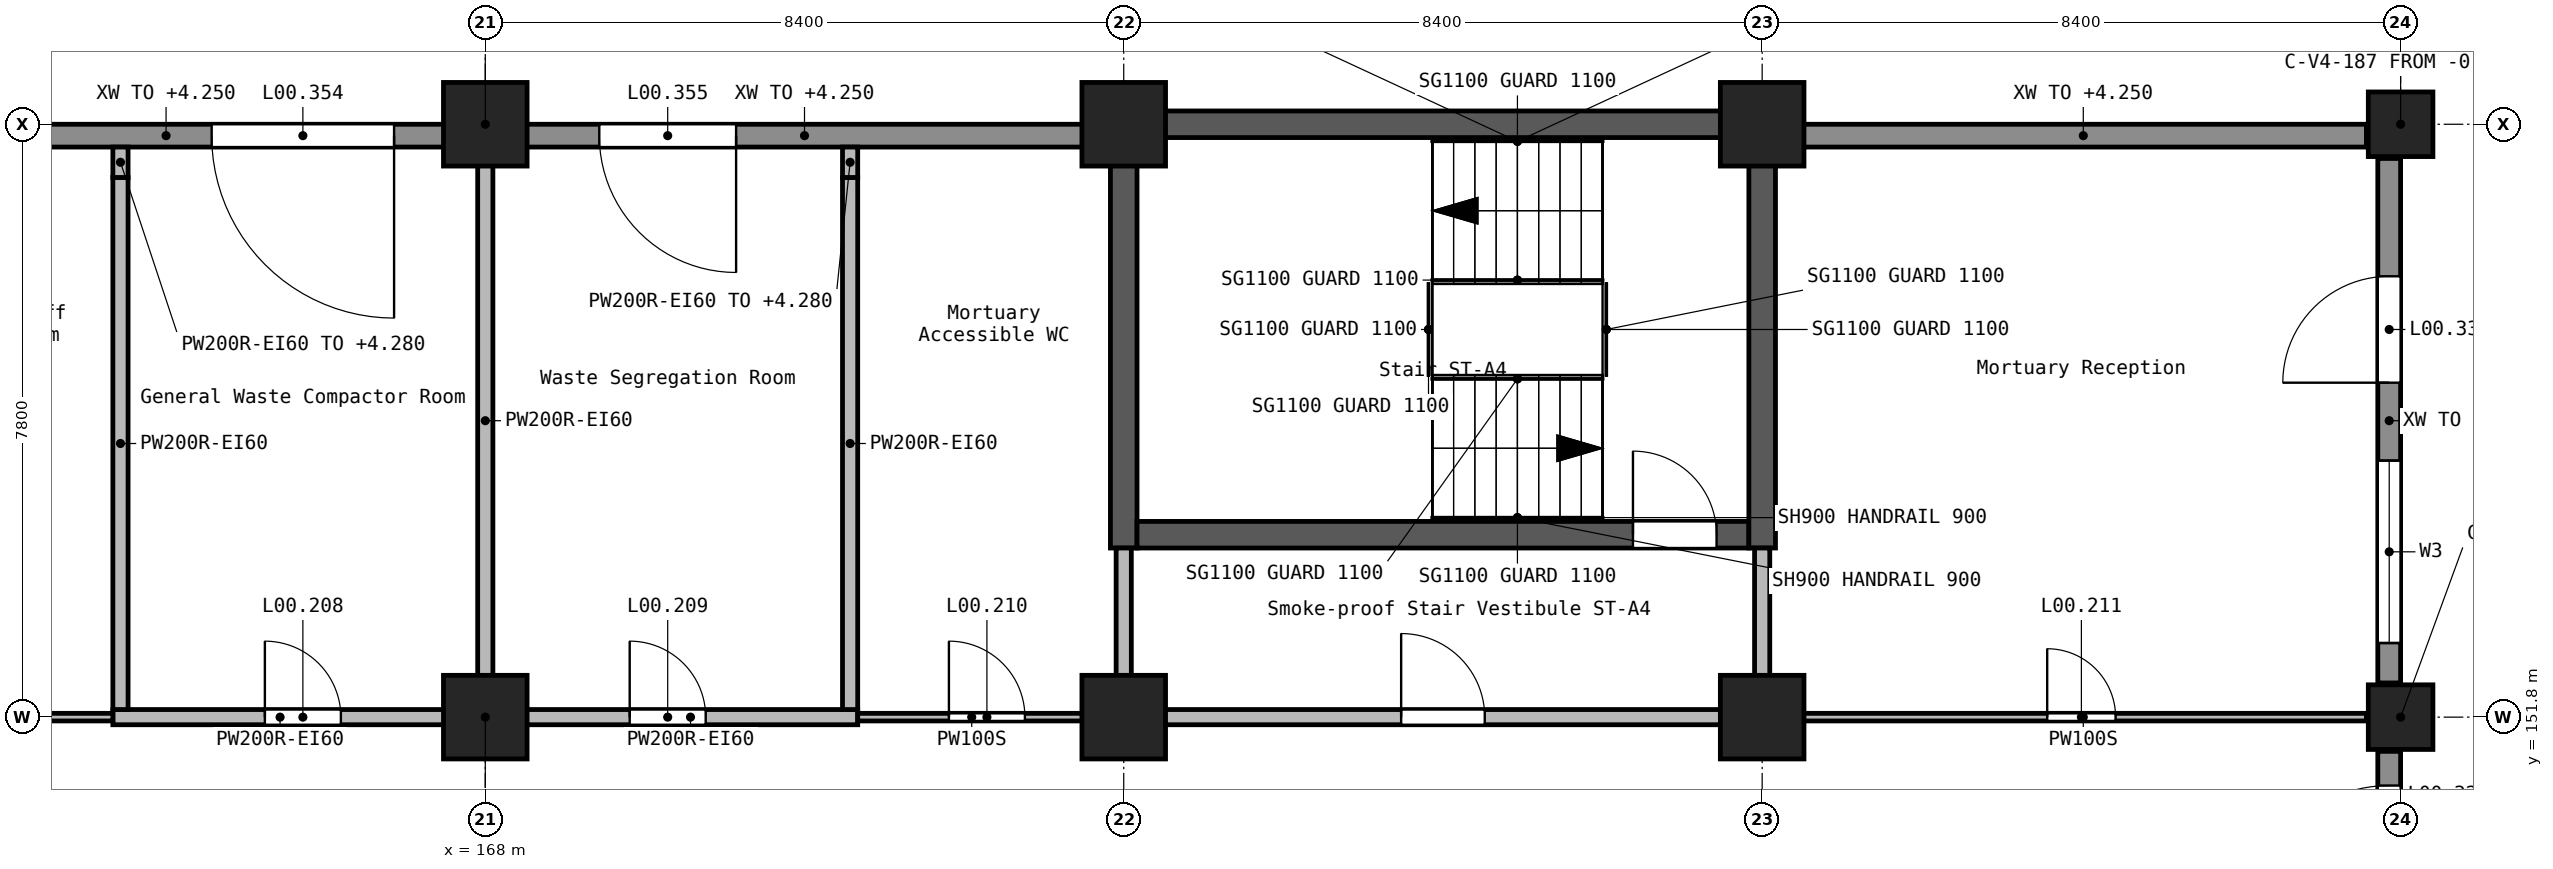
"""IFC4 building model, lengths in metres.
Left out: names, types, materials, properties, quantities, classifications, styles, units other than length and angle.
Written with IfcOpenShell. Run it as: python <this file> out.ifc"""

import sys

from ifc_helpers import new_model, si_unit, direction, frame, frame_2d, origin, origin_2d, place, context, subcontext, project, spatial, rectangle, extrude, element, fill, save


model = new_model("IFC4")
c1 = context("Model", 3, precision=1e-05, world=origin(), true_north=direction((0.0, 1.0)))
c2 = subcontext(c1, "Body", "Model", "MODEL_VIEW")
j1 = project(units=[si_unit("LENGTHUNIT", "METRE"), si_unit("PLANEANGLEUNIT", "RADIAN")], contexts=[c1])
p1 = place(None, origin())
s1 = spatial("IfcSite", under=j1, at=p1, CompositionType="ELEMENT")
p2 = place(p1, origin())
s2 = spatial("IfcBuilding", under=s1, at=p2, CompositionType="ELEMENT")
p3 = place(p2, origin())
s3 = spatial("IfcBuildingStorey", under=s2, at=p3, CompositionType="ELEMENT", Elevation=0.0)
for number, where, z_axis, x_axis in (
    (1, (168.0, 151.8, -0.3), (0.0, 0.0, 1.0), (1.0, 0.0, 0.0)),
    (2, (168.0, 159.6, -0.3), (0.0, 0.0, 1.0), (1.0, 0.0, 0.0)),
    (3, (176.4, 151.8, -0.3), (0.0, 0.0, 1.0), (1.0, 0.0, 0.0)),
    (4, (176.4, 159.6, -0.3), (0.0, 0.0, 1.0), (1.0, 0.0, 0.0)),
    (5, (184.8, 151.8, -0.3), (0.0, 0.0, 1.0), (1.0, 0.0, 0.0)),
    (6, (184.8, 159.6, -0.3), (0.0, 0.0, 1.0), (1.0, 0.0, 0.0)),
):
    element("IfcColumn", number, at=place(p3, frame(where, z_axis=z_axis, x_axis=x_axis)), inside=s3, PredefinedType="COLUMN", context=c2, shape_type="SweptSolid", body=[
        extrude(rectangle(XDim=1.1, YDim=1.1, at=origin_2d()), origin(), (0.0, 0.0, 1.0), 5.7),
    ])
for number, where, z_axis, x_axis in (
    (7, (193.2, 151.8, -0.3), (0.0, 0.0, 1.0), (1.0, 0.0, 0.0)),
    (8, (193.2, 159.6, -0.3), (0.0, 0.0, 1.0), (1.0, 0.0, 0.0)),
):
    element("IfcColumn", number, at=place(p3, frame(where, z_axis=z_axis, x_axis=x_axis)), inside=s3, PredefinedType="COLUMN", context=c2, shape_type="SweptSolid", body=[
        extrude(rectangle(XDim=0.85, YDim=0.85, at=origin_2d()), origin(), (0.0, 0.0, 1.0), 5.7),
    ])
p4 = place(p3, frame((176.225, 159.6, -0.3), z_axis=(0.0, 0.0, 1.0), x_axis=(1.0, 0.0, 0.0)))
e9 = element("IfcWall", 9, at=p4, inside=s3, PredefinedType="SHEAR", context=c2, shape_type="SweptSolid", body=[
    extrude(rectangle(XDim=8.4, YDim=0.35, at=frame_2d((4.2, 0.0))), origin(), (0.0, 0.0, 1.0), 5.7),
])
p5 = place(p3, frame((176.4, 154.025, -0.3), z_axis=(0.0, 0.0, 1.0), x_axis=(0.0, 1.0, 0.0)))
e10 = element("IfcWall", 10, at=p5, inside=s3, PredefinedType="SHEAR", context=c2, shape_type="SweptSolid", body=[
    extrude(rectangle(XDim=5.4, YDim=0.35, at=frame_2d((2.7, 0.0))), origin(), (0.0, 0.0, 1.0), 5.7),
])
p6 = place(p3, frame((176.575, 154.2, -0.3), z_axis=(0.0, 0.0, 1.0), x_axis=(1.0, 0.0, 0.0)))
e11 = element("IfcWall", 11, at=p6, inside=s3, PredefinedType="SHEAR", context=c2, shape_type="SweptSolid", body=[
    extrude(rectangle(XDim=8.05, YDim=0.35, at=frame_2d((4.025, 0.0))), origin(), (0.0, 0.0, 1.0), 5.7),
])
p7 = place(p6, frame((6.525, 0.0, 0.3)))
e12 = element("IfcOpeningElement", 12, at=p7, cuts=e11, PredefinedType="OPENING", context=c2, shape_type="SweptSolid", body=[
    extrude(rectangle(XDim=1.1, YDim=2.1, at=frame_2d((0.55, 1.05))), frame((0.0, 0.185, 0.0), z_axis=(0.0, -1.0, 0.0), x_axis=(1.0, 0.0, 0.0)), (0.0, 0.0, 1.0), 0.37),
])
p8 = place(p3, frame((184.8, 154.025, -0.3), z_axis=(0.0, 0.0, 1.0), x_axis=(0.0, 1.0, 0.0)))
e13 = element("IfcWall", 13, at=p8, inside=s3, PredefinedType="SHEAR", context=c2, shape_type="SweptSolid", body=[
    extrude(rectangle(XDim=5.75, YDim=0.35, at=frame_2d((2.875, 0.0))), origin(), (0.0, 0.0, 1.0), 5.7),
])
p9 = place(p3, frame((193.05, 148.65, 0.0), z_axis=(0.0, 0.0, 1.0), x_axis=(0.0, 1.0, 0.0)))
e14 = element("IfcWall", 14, at=p9, inside=s3, PredefinedType="STANDARD", context=c2, shape_type="SweptSolid", body=[
    extrude(rectangle(XDim=2.7, YDim=0.3, at=frame_2d((1.35, 0.0))), origin(), (0.0, 0.0, 1.0), 4.25),
])
p10 = place(p9, frame((0.45, 0.0, 0.0)))
e15 = element("IfcOpeningElement", 15, at=p10, cuts=e14, PredefinedType="OPENING", context=c2, shape_type="SweptSolid", body=[
    extrude(rectangle(XDim=1.8, YDim=2.1, at=frame_2d((0.9, 1.05))), frame((0.0, 0.16, 0.0), z_axis=(0.0, -1.0, 0.0), x_axis=(1.0, 0.0, 0.0)), (0.0, 0.0, 1.0), 0.32),
])
p11 = place(p3, frame((193.05, 152.25, 0.0), z_axis=(0.0, 0.0, 1.0), x_axis=(0.0, 1.0, 0.0)))
e16 = element("IfcWall", 16, at=p11, inside=s3, PredefinedType="STANDARD", context=c2, shape_type="SweptSolid", body=[
    extrude(rectangle(XDim=6.9, YDim=0.3, at=frame_2d((3.45, 0.0))), origin(), (0.0, 0.0, 1.0), 4.25),
])
p12 = place(p11, frame((3.95, 0.0, 0.0)))
e17 = element("IfcOpeningElement", 17, at=p12, cuts=e16, PredefinedType="OPENING", context=c2, shape_type="SweptSolid", body=[
    extrude(rectangle(XDim=1.4, YDim=2.1, at=frame_2d((0.7, 1.05))), frame((0.0, 0.16, 0.0), z_axis=(0.0, -1.0, 0.0), x_axis=(1.0, 0.0, 0.0)), (0.0, 0.0, 1.0), 0.32),
])
p13 = place(p11, frame((0.525, 0.0, 0.9)))
e18 = element("IfcOpeningElement", 18, at=p13, cuts=e16, PredefinedType="OPENING", context=c2, shape_type="SweptSolid", body=[
    extrude(rectangle(XDim=2.4, YDim=1.5, at=frame_2d((1.2, 0.75))), frame((0.0, 0.16, 0.0), z_axis=(0.0, -1.0, 0.0), x_axis=(1.0, 0.0, 0.0)), (0.0, 0.0, 1.0), 0.32),
])
p14 = place(p3, frame((192.75, 159.45, 0.0), z_axis=(0.0, 0.0, 1.0), x_axis=(-1.0, 0.0, 0.0)))
e19 = element("IfcWall", 19, at=p14, inside=s3, PredefinedType="STANDARD", context=c2, shape_type="SweptSolid", body=[
    extrude(rectangle(XDim=7.45, YDim=0.3, at=frame_2d((3.725, 0.0))), origin(), (0.0, 0.0, 1.0), 4.25),
])
p15 = place(p3, frame((175.9, 159.45, 0.0), z_axis=(0.0, 0.0, 1.0), x_axis=(-1.0, 0.0, 0.0)))
e20 = element("IfcWall", 20, at=p15, inside=s3, PredefinedType="STANDARD", context=c2, shape_type="SweptSolid", body=[
    extrude(rectangle(XDim=7.4, YDim=0.3, at=frame_2d((3.7, 0.0))), origin(), (0.0, 0.0, 1.0), 4.25),
])
p16 = place(p15, frame((4.6, 0.0, 0.0)))
e21 = element("IfcOpeningElement", 21, at=p16, cuts=e20, PredefinedType="OPENING", context=c2, shape_type="SweptSolid", body=[
    extrude(rectangle(XDim=1.8, YDim=2.1, at=frame_2d((0.9, 1.05))), frame((0.0, 0.16, 0.0), z_axis=(0.0, -1.0, 0.0), x_axis=(1.0, 0.0, 0.0)), (0.0, 0.0, 1.0), 0.32),
])
p17 = place(p3, frame((167.5, 159.45, 0.0), z_axis=(0.0, 0.0, 1.0), x_axis=(-1.0, 0.0, 0.0)))
e22 = element("IfcWall", 22, at=p17, inside=s3, PredefinedType="STANDARD", context=c2, shape_type="SweptSolid", body=[
    extrude(rectangle(XDim=7.4, YDim=0.3, at=frame_2d((3.7, 0.0))), origin(), (0.0, 0.0, 1.0), 4.25),
])
p18 = place(p17, frame((0.7, 0.0, 0.0)))
e23 = element("IfcOpeningElement", 23, at=p18, cuts=e22, PredefinedType="OPENING", context=c2, shape_type="SweptSolid", body=[
    extrude(rectangle(XDim=2.4, YDim=2.4, at=frame_2d((1.2, 1.2))), frame((0.0, 0.16, 0.0), z_axis=(0.0, -1.0, 0.0), x_axis=(1.0, 0.0, 0.0)), (0.0, 0.0, 1.0), 0.32),
])
p19 = place(p3, frame((163.1, 151.8, 0.0), z_axis=(0.0, 0.0, 1.0), x_axis=(1.0, 0.0, 0.0)))
e24 = element("IfcWall", 24, at=p19, inside=s3, PredefinedType="SOLIDWALL", context=c2, shape_type="SweptSolid", body=[
    extrude(rectangle(XDim=4.4, YDim=0.2, at=frame_2d((2.2, 0.0))), origin(), (0.0, 0.0, 1.0), 5.05),
])
p20 = place(p19, frame((2.0, 0.0, 0.0)))
e25 = element("IfcOpeningElement", 25, at=p20, cuts=e24, PredefinedType="OPENING", context=c2, shape_type="SweptSolid", body=[
    extrude(rectangle(XDim=1.0, YDim=2.1, at=frame_2d((0.5, 1.05))), frame((0.0, 0.11, 0.0), z_axis=(0.0, -1.0, 0.0), x_axis=(1.0, 0.0, 0.0)), (0.0, 0.0, 1.0), 0.22),
])
p21 = place(p3, frame((168.5, 151.8, 0.0), z_axis=(0.0, 0.0, 1.0), x_axis=(1.0, 0.0, 0.0)))
e26 = element("IfcWall", 26, at=p21, inside=s3, PredefinedType="SOLIDWALL", context=c2, shape_type="SweptSolid", body=[
    extrude(rectangle(XDim=4.4, YDim=0.2, at=frame_2d((2.2, 0.0))), origin(), (0.0, 0.0, 1.0), 5.05),
])
p22 = place(p21, frame((1.4, 0.0, 0.0)))
e27 = element("IfcOpeningElement", 27, at=p22, cuts=e26, PredefinedType="OPENING", context=c2, shape_type="SweptSolid", body=[
    extrude(rectangle(XDim=1.0, YDim=2.1, at=frame_2d((0.5, 1.05))), frame((0.0, 0.11, 0.0), z_axis=(0.0, -1.0, 0.0), x_axis=(1.0, 0.0, 0.0)), (0.0, 0.0, 1.0), 0.22),
])
p23 = place(p3, frame((176.9, 151.8, 0.0), z_axis=(0.0, 0.0, 1.0), x_axis=(1.0, 0.0, 0.0)))
e28 = element("IfcWall", 28, at=p23, inside=s3, PredefinedType="SOLIDWALL", context=c2, shape_type="SweptSolid", body=[
    extrude(rectangle(XDim=7.4, YDim=0.2, at=frame_2d((3.7, 0.0))), origin(), (0.0, 0.0, 1.0), 5.05),
])
p24 = place(p23, frame((3.15, 0.0, 0.0)))
e29 = element("IfcOpeningElement", 29, at=p24, cuts=e28, PredefinedType="OPENING", context=c2, shape_type="SweptSolid", body=[
    extrude(rectangle(XDim=1.1, YDim=2.1, at=frame_2d((0.55, 1.05))), frame((0.0, 0.11, 0.0), z_axis=(0.0, -1.0, 0.0), x_axis=(1.0, 0.0, 0.0)), (0.0, 0.0, 1.0), 0.22),
])
p25 = place(p3, frame((163.2, 151.9, 0.0), z_axis=(0.0, 0.0, 1.0), x_axis=(0.0, 1.0, 0.0)))
e30 = element("IfcWall", 30, at=p25, inside=s3, PredefinedType="SOLIDWALL", context=c2, shape_type="SweptSolid", body=[
    extrude(rectangle(XDim=7.0, YDim=0.2, at=frame_2d((3.5, 0.0))), origin(), (0.0, 0.0, 1.0), 5.05),
])
p26 = place(p3, frame((163.2, 158.9, 0.0), z_axis=(0.0, 0.0, 1.0), x_axis=(0.0, 1.0, 0.0)))
e31 = element("IfcWall", 31, at=p26, inside=s3, PredefinedType="SOLIDWALL", context=c2, shape_type="SweptSolid", body=[
    extrude(rectangle(XDim=0.4, YDim=0.2, at=frame_2d((0.2, 0.0))), origin(), (0.0, 0.0, 1.0), 4.28),
])
p27 = place(p3, frame((168.0, 152.3, 0.0), z_axis=(0.0, 0.0, 1.0), x_axis=(0.0, 1.0, 0.0)))
e32 = element("IfcWall", 32, at=p27, inside=s3, PredefinedType="SOLIDWALL", context=c2, shape_type="SweptSolid", body=[
    extrude(rectangle(XDim=6.8, YDim=0.2, at=frame_2d((3.4, 0.0))), origin(), (0.0, 0.0, 1.0), 5.05),
])
p28 = place(p3, frame((172.8, 151.9, 0.0), z_axis=(0.0, 0.0, 1.0), x_axis=(0.0, 1.0, 0.0)))
e33 = element("IfcWall", 33, at=p28, inside=s3, PredefinedType="SOLIDWALL", context=c2, shape_type="SweptSolid", body=[
    extrude(rectangle(XDim=7.0, YDim=0.2, at=frame_2d((3.5, 0.0))), origin(), (0.0, 0.0, 1.0), 5.05),
])
p29 = place(p3, frame((172.8, 158.9, 0.0), z_axis=(0.0, 0.0, 1.0), x_axis=(0.0, 1.0, 0.0)))
e34 = element("IfcWall", 34, at=p29, inside=s3, PredefinedType="SOLIDWALL", context=c2, shape_type="SweptSolid", body=[
    extrude(rectangle(XDim=0.4, YDim=0.2, at=frame_2d((0.2, 0.0))), origin(), (0.0, 0.0, 1.0), 4.28),
])
for number, where, z_axis, x_axis in (
    (35, (176.4, 152.3, 0.0), (0.0, 0.0, 1.0), (0.0, 1.0, 0.0)),
    (36, (184.8, 152.3, 0.0), (0.0, 0.0, 1.0), (0.0, 1.0, 0.0)),
):
    element("IfcWall", number, at=place(p3, frame(where, z_axis=z_axis, x_axis=x_axis)), inside=s3, PredefinedType="SOLIDWALL", context=c2, shape_type="SweptSolid", body=[
        extrude(rectangle(XDim=1.725, YDim=0.2, at=frame_2d((0.862, 0.0))), origin(), (0.0, 0.0, 1.0), 5.05),
    ])
p30 = place(p3, frame((185.3, 151.8, 0.0), z_axis=(0.0, 0.0, 1.0), x_axis=(1.0, 0.0, 0.0)))
e37 = element("IfcWall", 37, at=p30, inside=s3, PredefinedType="PARTITIONING", context=c2, shape_type="SweptSolid", body=[
    extrude(rectangle(XDim=7.45, YDim=0.1, at=frame_2d((3.725, 0.0))), origin(), (0.0, 0.0, 1.0), 5.05),
])
p31 = place(p30, frame((3.25, 0.0, 0.0)))
e38 = element("IfcOpeningElement", 38, at=p31, cuts=e37, PredefinedType="OPENING", context=c2, shape_type="SweptSolid", body=[
    extrude(rectangle(XDim=0.9, YDim=2.1, at=frame_2d((0.45, 1.05))), frame((0.0, 0.06, 0.0), z_axis=(0.0, -1.0, 0.0), x_axis=(1.0, 0.0, 0.0)), (0.0, 0.0, 1.0), 0.12),
])
p32 = place(p3, frame((160.1, 151.8, 0.0), z_axis=(0.0, 0.0, 1.0), x_axis=(1.0, 0.0, 0.0)))
e39 = element("IfcWall", 39, at=p32, inside=s3, PredefinedType="PARTITIONING", context=c2, shape_type="SweptSolid", body=[
    extrude(rectangle(XDim=3.0, YDim=0.1, at=frame_2d((1.5, 0.0))), origin(), (0.0, 0.0, 1.0), 5.05),
])
p33 = place(p32, frame((0.85, 0.0, 0.0)))
e40 = element("IfcOpeningElement", 40, at=p33, cuts=e39, PredefinedType="OPENING", context=c2, shape_type="SweptSolid", body=[
    extrude(rectangle(XDim=0.9, YDim=2.1, at=frame_2d((0.45, 1.05))), frame((0.0, 0.06, 0.0), z_axis=(0.0, -1.0, 0.0), x_axis=(1.0, 0.0, 0.0)), (0.0, 0.0, 1.0), 0.12),
])
p34 = place(p3, frame((172.9, 151.8, 0.0), z_axis=(0.0, 0.0, 1.0), x_axis=(1.0, 0.0, 0.0)))
e41 = element("IfcWall", 41, at=p34, inside=s3, PredefinedType="PARTITIONING", context=c2, shape_type="SweptSolid", body=[
    extrude(rectangle(XDim=3.0, YDim=0.1, at=frame_2d((1.5, 0.0))), origin(), (0.0, 0.0, 1.0), 5.05),
])
p35 = place(p34, frame((1.2, 0.0, 0.0)))
e42 = element("IfcOpeningElement", 42, at=p35, cuts=e41, PredefinedType="OPENING", context=c2, shape_type="SweptSolid", body=[
    extrude(rectangle(XDim=1.0, YDim=2.1, at=frame_2d((0.5, 1.05))), frame((0.0, 0.06, 0.0), z_axis=(0.0, -1.0, 0.0), x_axis=(1.0, 0.0, 0.0)), (0.0, 0.0, 1.0), 0.12),
])
p36 = place(p12, frame((1.4, 0.0, 0.0), z_axis=(0.0, 0.0, 1.0), x_axis=(-1.0, 0.0, 0.0)))
e43 = element("IfcDoor", 43, at=p36, inside=s3, OperationType="SINGLE_SWING_LEFT", PredefinedType="DOOR", context=c2, shape_type="SweptSolid", body=[
    extrude(rectangle(XDim=1.4, YDim=2.1, at=frame_2d((0.7, 1.05))), frame((0.0, 0.025, 0.0), z_axis=(0.0, -1.0, 0.0), x_axis=(1.0, 0.0, 0.0)), (0.0, 0.0, 1.0), 0.05),
])
fill(e17, e43)
p37 = place(p18, frame((2.4, 0.0, 0.0), z_axis=(0.0, 0.0, 1.0), x_axis=(-1.0, 0.0, 0.0)))
e44 = element("IfcDoor", 44, at=p37, inside=s3, OperationType="SINGLE_SWING_LEFT", PredefinedType="DOOR", context=c2, shape_type="SweptSolid", body=[
    extrude(rectangle(XDim=2.4, YDim=2.4, at=frame_2d((1.2, 1.2))), frame((0.0, 0.025, 0.0), z_axis=(0.0, -1.0, 0.0), x_axis=(1.0, 0.0, 0.0)), (0.0, 0.0, 1.0), 0.05),
])
fill(e23, e44)
p38 = place(p16, frame((1.8, 0.0, 0.0), z_axis=(0.0, 0.0, 1.0), x_axis=(-1.0, 0.0, 0.0)))
e45 = element("IfcDoor", 45, at=p38, inside=s3, OperationType="SINGLE_SWING_LEFT", PredefinedType="DOOR", context=c2, shape_type="SweptSolid", body=[
    extrude(rectangle(XDim=1.8, YDim=2.1, at=frame_2d((0.9, 1.05))), frame((0.0, 0.025, 0.0), z_axis=(0.0, -1.0, 0.0), x_axis=(1.0, 0.0, 0.0)), (0.0, 0.0, 1.0), 0.05),
])
fill(e21, e45)
p39 = place(p10, frame((1.8, 0.0, 0.0), z_axis=(0.0, 0.0, 1.0), x_axis=(-1.0, 0.0, 0.0)))
e46 = element("IfcDoor", 46, at=p39, inside=s3, OperationType="SINGLE_SWING_LEFT", PredefinedType="DOOR", context=c2, shape_type="SweptSolid", body=[
    extrude(rectangle(XDim=1.8, YDim=2.1, at=frame_2d((0.9, 1.05))), frame((0.0, 0.025, 0.0), z_axis=(0.0, -1.0, 0.0), x_axis=(1.0, 0.0, 0.0)), (0.0, 0.0, 1.0), 0.05),
])
fill(e15, e46)
p40 = place(p13, origin())
e47 = element("IfcWindow", 47, at=p40, inside=s3, PartitioningType="SINGLE_PANEL", PredefinedType="WINDOW", context=c2, shape_type="SweptSolid", body=[
    extrude(rectangle(XDim=2.4, YDim=1.5, at=frame_2d((1.2, 0.75))), frame((0.0, 0.03, 0.0), z_axis=(0.0, -1.0, 0.0), x_axis=(1.0, 0.0, 0.0)), (0.0, 0.0, 1.0), 0.06),
])
fill(e18, e47)
p41 = place(p7, origin())
e48 = element("IfcDoor", 48, at=p41, inside=s3, OperationType="SINGLE_SWING_RIGHT", PredefinedType="DOOR", context=c2, shape_type="SweptSolid", body=[
    extrude(rectangle(XDim=1.1, YDim=2.1, at=frame_2d((0.55, 1.05))), frame((0.0, 0.025, 0.0), z_axis=(0.0, -1.0, 0.0), x_axis=(1.0, 0.0, 0.0)), (0.0, 0.0, 1.0), 0.05),
])
fill(e12, e48)
p42 = place(p24, origin())
e49 = element("IfcDoor", 49, at=p42, inside=s3, OperationType="SINGLE_SWING_RIGHT", PredefinedType="DOOR", context=c2, shape_type="SweptSolid", body=[
    extrude(rectangle(XDim=1.1, YDim=2.1, at=frame_2d((0.55, 1.05))), frame((0.0, 0.025, 0.0), z_axis=(0.0, -1.0, 0.0), x_axis=(1.0, 0.0, 0.0)), (0.0, 0.0, 1.0), 0.05),
])
fill(e29, e49)
p43 = place(p20, origin())
e50 = element("IfcDoor", 50, at=p43, inside=s3, OperationType="SINGLE_SWING_RIGHT", PredefinedType="DOOR", context=c2, shape_type="SweptSolid", body=[
    extrude(rectangle(XDim=1.0, YDim=2.1, at=frame_2d((0.5, 1.05))), frame((0.0, 0.025, 0.0), z_axis=(0.0, -1.0, 0.0), x_axis=(1.0, 0.0, 0.0)), (0.0, 0.0, 1.0), 0.05),
])
fill(e25, e50)
p44 = place(p22, origin())
e51 = element("IfcDoor", 51, at=p44, inside=s3, OperationType="SINGLE_SWING_LEFT", PredefinedType="DOOR", context=c2, shape_type="SweptSolid", body=[
    extrude(rectangle(XDim=1.0, YDim=2.1, at=frame_2d((0.5, 1.05))), frame((0.0, 0.025, 0.0), z_axis=(0.0, -1.0, 0.0), x_axis=(1.0, 0.0, 0.0)), (0.0, 0.0, 1.0), 0.05),
])
fill(e27, e51)
p45 = place(p35, origin())
e52 = element("IfcDoor", 52, at=p45, inside=s3, OperationType="SINGLE_SWING_RIGHT", PredefinedType="DOOR", context=c2, shape_type="SweptSolid", body=[
    extrude(rectangle(XDim=1.0, YDim=2.1, at=frame_2d((0.5, 1.05))), frame((0.0, 0.025, 0.0), z_axis=(0.0, -1.0, 0.0), x_axis=(1.0, 0.0, 0.0)), (0.0, 0.0, 1.0), 0.05),
])
fill(e42, e52)
p46 = place(p31, origin())
e53 = element("IfcDoor", 53, at=p46, inside=s3, OperationType="SINGLE_SWING_LEFT", PredefinedType="DOOR", context=c2, shape_type="SweptSolid", body=[
    extrude(rectangle(XDim=0.9, YDim=2.1, at=frame_2d((0.45, 1.05))), frame((0.0, 0.025, 0.0), z_axis=(0.0, -1.0, 0.0), x_axis=(1.0, 0.0, 0.0)), (0.0, 0.0, 1.0), 0.05),
])
fill(e38, e53)
save(model, sys.argv[1])
